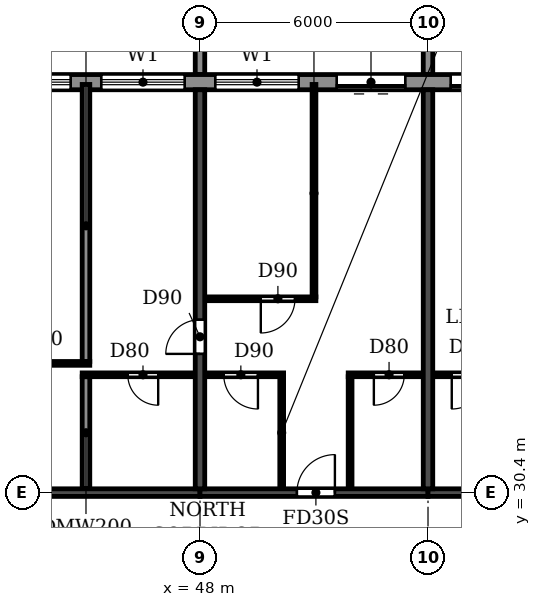
"""IFC4 building model, lengths in metres.
Left out: names, types, materials, properties, quantities, classifications, styles, units other than length and angle.
Written with IfcOpenShell. Run it as: python <this file> out.ifc"""

import sys

from ifc_helpers import new_model, si_unit, direction, frame, frame_2d, origin, place, context, subcontext, project, spatial, polyline, rectangle, outline, extrude, source, transform, mapped, element, fill, save


model = new_model("IFC4")
c1 = context("Model", 3, precision=1e-05, world=origin(), true_north=direction((0.0, 1.0)))
c2 = subcontext(c1, "Body", "Model", "MODEL_VIEW")
j1 = project(units=[si_unit("LENGTHUNIT", "METRE"), si_unit("PLANEANGLEUNIT", "RADIAN")], contexts=[c1])
p1 = place(None, origin())
s1 = spatial("IfcSite", under=j1, at=p1, CompositionType="ELEMENT")
p2 = place(p1, origin())
s2 = spatial("IfcBuilding", under=s1, at=p2, CompositionType="ELEMENT")
p3 = place(p2, frame((0.0, 0.0, 251.1)))
s3 = spatial("IfcBuildingStorey", under=s2, at=p3, CompositionType="ELEMENT", Elevation=251.1)
p4 = place(p3, frame((48.0, 30.5, 0.0), z_axis=(0.0, 0.0, 1.0), x_axis=(0.0, 1.0, 0.0)))
e1 = element("IfcWall", 1, at=p4, inside=s3, PredefinedType="SHEAR", context=c2, shape_type="SweptSolid", body=[
    extrude(rectangle(XDim=10.5, YDim=0.25, at=frame_2d((5.25, 0.0))), origin(), (0.0, 0.0, 1.0), 3.08),
])
p5 = place(p4, frame((3.55, 0.0, 0.0)))
e2 = element("IfcOpeningElement", 2, at=p5, cuts=e1, PredefinedType="OPENING", context=c2, shape_type="SweptSolid", body=[
    extrude(rectangle(XDim=0.9, YDim=2.1, at=frame_2d((0.45, 1.05))), frame((0.0, 0.135, 0.0), z_axis=(0.0, -1.0, 0.0), x_axis=(1.0, 0.0, 0.0)), (0.0, 0.0, 1.0), 0.27),
])
p6 = place(p3, frame((54.0, 30.5, 0.0), z_axis=(0.0, 0.0, 1.0), x_axis=(0.0, 1.0, 0.0)))
e3 = element("IfcWall", 3, at=p6, inside=s3, PredefinedType="SHEAR", context=c2, shape_type="SweptSolid", body=[
    extrude(rectangle(XDim=10.5, YDim=0.25, at=frame_2d((5.25, 0.0))), origin(), (0.0, 0.0, 1.0), 3.08),
])
p7 = place(p3, frame((42.0, 30.4, 0.0), z_axis=(0.0, 0.0, 1.0), x_axis=(1.0, 0.0, 0.0)))
e4 = element("IfcWall", 4, at=p7, inside=s3, PredefinedType="SHEAR", context=c2, shape_type="SweptSolid", body=[
    extrude(rectangle(XDim=6.0, YDim=0.2, at=frame_2d((3.0, 0.0))), origin(), (0.0, 0.0, 1.0), 2.48),
])
p8 = place(p3, frame((48.0, 30.4, 0.0), z_axis=(0.0, 0.0, 1.0), x_axis=(1.0, 0.0, 0.0)))
e5 = element("IfcWall", 5, at=p8, inside=s3, PredefinedType="SHEAR", context=c2, shape_type="SweptSolid", body=[
    extrude(rectangle(XDim=6.0, YDim=0.2, at=frame_2d((3.0, 0.0))), origin(), (0.0, 0.0, 1.0), 2.48),
])
p9 = place(p8, frame((2.55, 0.0, 0.0)))
e6 = element("IfcOpeningElement", 6, at=p9, cuts=e5, PredefinedType="OPENING", context=c2, shape_type="SweptSolid", body=[
    extrude(rectangle(XDim=1.0, YDim=2.1, at=frame_2d((0.5, 1.05))), frame((0.0, 0.11, 0.0), z_axis=(0.0, -1.0, 0.0), x_axis=(1.0, 0.0, 0.0)), (0.0, 0.0, 1.0), 0.22),
])
p10 = place(p3, frame((54.0, 30.4, 0.0), z_axis=(0.0, 0.0, 1.0), x_axis=(1.0, 0.0, 0.0)))
e7 = element("IfcWall", 7, at=p10, inside=s3, PredefinedType="SHEAR", context=c2, shape_type="SweptSolid", body=[
    extrude(rectangle(XDim=6.0, YDim=0.2, at=frame_2d((3.0, 0.0))), origin(), (0.0, 0.0, 1.0), 2.48),
])
p11 = place(p10, frame((2.55, 0.0, 0.0)))
e8 = element("IfcOpeningElement", 8, at=p11, cuts=e7, PredefinedType="OPENING", context=c2, shape_type="SweptSolid", body=[
    extrude(rectangle(XDim=1.0, YDim=2.1, at=frame_2d((0.5, 1.05))), frame((0.0, 0.11, 0.0), z_axis=(0.0, -1.0, 0.0), x_axis=(1.0, 0.0, 0.0)), (0.0, 0.0, 1.0), 0.22),
])
p12 = place(p3, frame((79.317, 41.2, 0.0), z_axis=(0.0, 0.0, 1.0), x_axis=(-1.0, 0.0, 0.0)))
e9 = element("IfcWall", 9, at=p12, inside=s3, PredefinedType="STANDARD", context=c2, shape_type="SweptSolid", body=[
    extrude(rectangle(XDim=56.634, YDim=0.4, at=frame_2d((28.317, 0.0))), origin(), (0.0, 0.0, 1.0), 3.08),
])
p13 = place(p12, frame((52.717, 0.0, 0.9)))
e10 = element("IfcOpeningElement", 10, at=p13, cuts=e9, PredefinedType="OPENING", context=c2, shape_type="SweptSolid", body=[
    extrude(rectangle(XDim=2.2, YDim=1.5, at=frame_2d((1.1, 0.75))), frame((0.0, 0.21, 0.0), z_axis=(0.0, -1.0, 0.0), x_axis=(1.0, 0.0, 0.0)), (0.0, 0.0, 1.0), 0.42),
])
p14 = place(p12, frame((49.717, 0.0, 0.9)))
e11 = element("IfcOpeningElement", 11, at=p14, cuts=e9, PredefinedType="OPENING", context=c2, shape_type="SweptSolid", body=[
    extrude(rectangle(XDim=2.2, YDim=1.5, at=frame_2d((1.1, 0.75))), frame((0.0, 0.21, 0.0), z_axis=(0.0, -1.0, 0.0), x_axis=(1.0, 0.0, 0.0)), (0.0, 0.0, 1.0), 0.42),
])
p15 = place(p12, frame((46.717, 0.0, 0.9)))
e12 = element("IfcOpeningElement", 12, at=p15, cuts=e9, PredefinedType="OPENING", context=c2, shape_type="SweptSolid", body=[
    extrude(rectangle(XDim=2.2, YDim=1.5, at=frame_2d((1.1, 0.75))), frame((0.0, 0.21, 0.0), z_axis=(0.0, -1.0, 0.0), x_axis=(1.0, 0.0, 0.0)), (0.0, 0.0, 1.0), 0.42),
])
p16 = place(p12, frame((43.917, 0.0, 0.0)))
e13 = element("IfcOpeningElement", 13, at=p16, cuts=e9, PredefinedType="OPENING", context=c2, shape_type="SweptSolid", body=[
    extrude(rectangle(XDim=1.8, YDim=2.4, at=frame_2d((0.9, 1.2))), frame((0.0, 0.21, 0.0), z_axis=(0.0, -1.0, 0.0), x_axis=(1.0, 0.0, 0.0)), (0.0, 0.0, 1.0), 0.42),
])
p17 = place(p12, frame((40.717, 0.0, 0.9)))
e14 = element("IfcOpeningElement", 14, at=p17, cuts=e9, PredefinedType="OPENING", context=c2, shape_type="SweptSolid", body=[
    extrude(rectangle(XDim=2.2, YDim=1.5, at=frame_2d((1.1, 0.75))), frame((0.0, 0.21, 0.0), z_axis=(0.0, -1.0, 0.0), x_axis=(1.0, 0.0, 0.0)), (0.0, 0.0, 1.0), 0.42),
])
p18 = place(p12, frame((37.917, 0.0, 0.0)))
e15 = element("IfcOpeningElement", 15, at=p18, cuts=e9, PredefinedType="OPENING", context=c2, shape_type="SweptSolid", body=[
    extrude(rectangle(XDim=1.8, YDim=2.4, at=frame_2d((0.9, 1.2))), frame((0.0, 0.21, 0.0), z_axis=(0.0, -1.0, 0.0), x_axis=(1.0, 0.0, 0.0)), (0.0, 0.0, 1.0), 0.42),
])
p19 = place(p12, frame((34.717, 0.0, 0.9)))
e16 = element("IfcOpeningElement", 16, at=p19, cuts=e9, PredefinedType="OPENING", context=c2, shape_type="SweptSolid", body=[
    extrude(rectangle(XDim=2.2, YDim=1.5, at=frame_2d((1.1, 0.75))), frame((0.0, 0.21, 0.0), z_axis=(0.0, -1.0, 0.0), x_axis=(1.0, 0.0, 0.0)), (0.0, 0.0, 1.0), 0.42),
])
p20 = place(p12, frame((31.717, 0.0, 0.9)))
e17 = element("IfcOpeningElement", 17, at=p20, cuts=e9, PredefinedType="OPENING", context=c2, shape_type="SweptSolid", body=[
    extrude(rectangle(XDim=2.2, YDim=1.5, at=frame_2d((1.1, 0.75))), frame((0.0, 0.21, 0.0), z_axis=(0.0, -1.0, 0.0), x_axis=(1.0, 0.0, 0.0)), (0.0, 0.0, 1.0), 0.42),
])
p21 = place(p12, frame((28.717, 0.0, 0.9)))
e18 = element("IfcOpeningElement", 18, at=p21, cuts=e9, PredefinedType="OPENING", context=c2, shape_type="SweptSolid", body=[
    extrude(rectangle(XDim=2.2, YDim=1.5, at=frame_2d((1.1, 0.75))), frame((0.0, 0.21, 0.0), z_axis=(0.0, -1.0, 0.0), x_axis=(1.0, 0.0, 0.0)), (0.0, 0.0, 1.0), 0.42),
])
p22 = place(p12, frame((25.917, 0.0, 0.0)))
e19 = element("IfcOpeningElement", 19, at=p22, cuts=e9, PredefinedType="OPENING", context=c2, shape_type="SweptSolid", body=[
    extrude(rectangle(XDim=1.8, YDim=2.4, at=frame_2d((0.9, 1.2))), frame((0.0, 0.21, 0.0), z_axis=(0.0, -1.0, 0.0), x_axis=(1.0, 0.0, 0.0)), (0.0, 0.0, 1.0), 0.42),
])
p23 = place(p12, frame((22.917, 0.0, 0.0)))
e20 = element("IfcOpeningElement", 20, at=p23, cuts=e9, PredefinedType="OPENING", context=c2, shape_type="SweptSolid", body=[
    extrude(rectangle(XDim=1.8, YDim=2.4, at=frame_2d((0.9, 1.2))), frame((0.0, 0.21, 0.0), z_axis=(0.0, -1.0, 0.0), x_axis=(1.0, 0.0, 0.0)), (0.0, 0.0, 1.0), 0.42),
])
p24 = place(p12, frame((19.717, 0.0, 0.9)))
e21 = element("IfcOpeningElement", 21, at=p24, cuts=e9, PredefinedType="OPENING", context=c2, shape_type="SweptSolid", body=[
    extrude(rectangle(XDim=2.2, YDim=1.5, at=frame_2d((1.1, 0.75))), frame((0.0, 0.21, 0.0), z_axis=(0.0, -1.0, 0.0), x_axis=(1.0, 0.0, 0.0)), (0.0, 0.0, 1.0), 0.42),
])
p25 = place(p12, frame((16.717, 0.0, 0.9)))
e22 = element("IfcOpeningElement", 22, at=p25, cuts=e9, PredefinedType="OPENING", context=c2, shape_type="SweptSolid", body=[
    extrude(rectangle(XDim=2.2, YDim=1.5, at=frame_2d((1.1, 0.75))), frame((0.0, 0.21, 0.0), z_axis=(0.0, -1.0, 0.0), x_axis=(1.0, 0.0, 0.0)), (0.0, 0.0, 1.0), 0.42),
])
p26 = place(p12, frame((13.717, 0.0, 0.9)))
e23 = element("IfcOpeningElement", 23, at=p26, cuts=e9, PredefinedType="OPENING", context=c2, shape_type="SweptSolid", body=[
    extrude(rectangle(XDim=2.2, YDim=1.5, at=frame_2d((1.1, 0.75))), frame((0.0, 0.21, 0.0), z_axis=(0.0, -1.0, 0.0), x_axis=(1.0, 0.0, 0.0)), (0.0, 0.0, 1.0), 0.42),
])
p27 = place(p12, frame((10.717, 0.0, 0.9)))
e24 = element("IfcOpeningElement", 24, at=p27, cuts=e9, PredefinedType="OPENING", context=c2, shape_type="SweptSolid", body=[
    extrude(rectangle(XDim=2.2, YDim=1.5, at=frame_2d((1.1, 0.75))), frame((0.0, 0.21, 0.0), z_axis=(0.0, -1.0, 0.0), x_axis=(1.0, 0.0, 0.0)), (0.0, 0.0, 1.0), 0.42),
])
p28 = place(p12, frame((7.917, 0.0, 0.0)))
e25 = element("IfcOpeningElement", 25, at=p28, cuts=e9, PredefinedType="OPENING", context=c2, shape_type="SweptSolid", body=[
    extrude(rectangle(XDim=1.8, YDim=2.4, at=frame_2d((0.9, 1.2))), frame((0.0, 0.21, 0.0), z_axis=(0.0, -1.0, 0.0), x_axis=(1.0, 0.0, 0.0)), (0.0, 0.0, 1.0), 0.42),
])
p29 = place(p12, frame((4.717, 0.0, 0.9)))
e26 = element("IfcOpeningElement", 26, at=p29, cuts=e9, PredefinedType="OPENING", context=c2, shape_type="SweptSolid", body=[
    extrude(rectangle(XDim=2.2, YDim=1.5, at=frame_2d((1.1, 0.75))), frame((0.0, 0.21, 0.0), z_axis=(0.0, -1.0, 0.0), x_axis=(1.0, 0.0, 0.0)), (0.0, 0.0, 1.0), 0.42),
])
p30 = place(p12, frame((1.917, 0.0, 0.0)))
e27 = element("IfcOpeningElement", 27, at=p30, cuts=e9, PredefinedType="OPENING", context=c2, shape_type="SweptSolid", body=[
    extrude(rectangle(XDim=1.8, YDim=2.4, at=frame_2d((0.9, 1.2))), frame((0.0, 0.21, 0.0), z_axis=(0.0, -1.0, 0.0), x_axis=(1.0, 0.0, 0.0)), (0.0, 0.0, 1.0), 0.42),
])
m1 = source(origin(), c2, "Body", "SweptSolid", [
    extrude(outline(polyline([(0.0, 0.0), (0.25, 0.0), (0.25, 3.1), (0.0, 3.1), (0.0, 0.0)])), origin(), (0.0, 0.0, 1.0), 3.1),
])
for number, where in (
    (28, (47.875, 41.4, 0.0)),
    (29, (53.875, 41.4, 0.0)),
):
    element("IfcWall", number, at=place(p3, frame(where)), inside=s3, PredefinedType="STANDARD", context=c2, shape_type="MappedRepresentation", body=[
        mapped(m1, transform((0.0, 0.0, 0.0))),
    ])
p31 = place(p3, frame((45.0, 30.51, 0.0), z_axis=(0.0, 0.0, 1.0), x_axis=(0.0, 1.0, 0.0)))
e30 = element("IfcWall", 30, at=p31, inside=s3, PredefinedType="PARTITIONING", context=c2, shape_type="SweptSolid", body=[
    extrude(rectangle(XDim=2.94, YDim=0.2, at=frame_2d((1.47, 0.0))), origin(), (0.0, 0.0, 1.0), 3.08),
])
p32 = place(p3, frame((45.0, 33.85, 0.0), z_axis=(0.0, 0.0, 1.0), x_axis=(0.0, 1.0, 0.0)))
e31 = element("IfcWall", 31, at=p32, inside=s3, PredefinedType="PARTITIONING", context=c2, shape_type="SweptSolid", body=[
    extrude(rectangle(XDim=7.29, YDim=0.2, at=frame_2d((3.645, 0.0))), origin(), (0.0, 0.0, 1.0), 3.08),
])
p33 = place(p3, frame((44.9, 33.5, 0.0), z_axis=(0.0, 0.0, 1.0), x_axis=(1.0, 0.0, 0.0)))
e32 = element("IfcWall", 32, at=p33, inside=s3, PredefinedType="PARTITIONING", context=c2, shape_type="SweptSolid", body=[
    extrude(rectangle(XDim=2.965, YDim=0.1, at=frame_2d((1.482, 0.0))), origin(), (0.0, 0.0, 1.0), 3.08),
])
p34 = place(p33, frame((1.2, 0.0, 0.0)))
e33 = element("IfcOpeningElement", 33, at=p34, cuts=e32, PredefinedType="OPENING", context=c2, shape_type="SweptSolid", body=[
    extrude(rectangle(XDim=0.8, YDim=2.1, at=frame_2d((0.4, 1.05))), frame((0.0, 0.06, 0.0), z_axis=(0.0, -1.0, 0.0), x_axis=(1.0, 0.0, 0.0)), (0.0, 0.0, 1.0), 0.12),
])
p35 = place(p3, frame((48.135, 33.5, 0.0), z_axis=(0.0, 0.0, 1.0), x_axis=(1.0, 0.0, 0.0)))
e34 = element("IfcWall", 34, at=p35, inside=s3, PredefinedType="PARTITIONING", context=c2, shape_type="SweptSolid", body=[
    extrude(rectangle(XDim=2.065, YDim=0.1, at=frame_2d((1.032, 0.0))), origin(), (0.0, 0.0, 1.0), 3.08),
])
p36 = place(p35, frame((0.49, 0.0, 0.0)))
e35 = element("IfcOpeningElement", 35, at=p36, cuts=e34, PredefinedType="OPENING", context=c2, shape_type="SweptSolid", body=[
    extrude(rectangle(XDim=0.9, YDim=2.1, at=frame_2d((0.45, 1.05))), frame((0.0, 0.06, 0.0), z_axis=(0.0, -1.0, 0.0), x_axis=(1.0, 0.0, 0.0)), (0.0, 0.0, 1.0), 0.12),
])
p37 = place(p3, frame((51.9, 33.5, 0.0), z_axis=(0.0, 0.0, 1.0), x_axis=(1.0, 0.0, 0.0)))
e36 = element("IfcWall", 36, at=p37, inside=s3, PredefinedType="PARTITIONING", context=c2, shape_type="SweptSolid", body=[
    extrude(rectangle(XDim=1.965, YDim=0.1, at=frame_2d((0.982, 0.0))), origin(), (0.0, 0.0, 1.0), 3.08),
])
p38 = place(p37, frame((0.675, 0.0, 0.0)))
e37 = element("IfcOpeningElement", 37, at=p38, cuts=e36, PredefinedType="OPENING", context=c2, shape_type="SweptSolid", body=[
    extrude(rectangle(XDim=0.8, YDim=2.1, at=frame_2d((0.4, 1.05))), frame((0.0, 0.06, 0.0), z_axis=(0.0, -1.0, 0.0), x_axis=(1.0, 0.0, 0.0)), (0.0, 0.0, 1.0), 0.12),
])
p39 = place(p3, frame((54.135, 33.5, 0.0), z_axis=(0.0, 0.0, 1.0), x_axis=(1.0, 0.0, 0.0)))
e38 = element("IfcWall", 38, at=p39, inside=s3, PredefinedType="PARTITIONING", context=c2, shape_type="SweptSolid", body=[
    extrude(rectangle(XDim=2.065, YDim=0.1, at=frame_2d((1.032, 0.0))), origin(), (0.0, 0.0, 1.0), 3.08),
])
p40 = place(p39, frame((0.49, 0.0, 0.0)))
e39 = element("IfcOpeningElement", 39, at=p40, cuts=e38, PredefinedType="OPENING", context=c2, shape_type="SweptSolid", body=[
    extrude(rectangle(XDim=0.9, YDim=2.1, at=frame_2d((0.45, 1.05))), frame((0.0, 0.06, 0.0), z_axis=(0.0, -1.0, 0.0), x_axis=(1.0, 0.0, 0.0)), (0.0, 0.0, 1.0), 0.12),
])
p41 = place(p3, frame((42.135, 33.8, 0.0), z_axis=(0.0, 0.0, 1.0), x_axis=(1.0, 0.0, 0.0)))
e40 = element("IfcWall", 40, at=p41, inside=s3, PredefinedType="PARTITIONING", context=c2, shape_type="SweptSolid", body=[
    extrude(rectangle(XDim=2.965, YDim=0.1, at=frame_2d((1.482, 0.0))), origin(), (0.0, 0.0, 1.0), 3.08),
])
p42 = place(p41, frame((0.965, 0.0, 0.0)))
e41 = element("IfcOpeningElement", 41, at=p42, cuts=e40, PredefinedType="OPENING", context=c2, shape_type="SweptSolid", body=[
    extrude(rectangle(XDim=0.8, YDim=2.1, at=frame_2d((0.4, 1.05))), frame((0.0, 0.06, 0.0), z_axis=(0.0, -1.0, 0.0), x_axis=(1.0, 0.0, 0.0)), (0.0, 0.0, 1.0), 0.12),
])
p43 = place(p3, frame((48.135, 35.5, 0.0), z_axis=(0.0, 0.0, 1.0), x_axis=(1.0, 0.0, 0.0)))
e42 = element("IfcWall", 42, at=p43, inside=s3, PredefinedType="PARTITIONING", context=c2, shape_type="SweptSolid", body=[
    extrude(rectangle(XDim=2.915, YDim=0.1, at=frame_2d((1.458, 0.0))), origin(), (0.0, 0.0, 1.0), 3.08),
])
p44 = place(p43, frame((1.465, 0.0, 0.0)))
e43 = element("IfcOpeningElement", 43, at=p44, cuts=e42, PredefinedType="OPENING", context=c2, shape_type="SweptSolid", body=[
    extrude(rectangle(XDim=0.9, YDim=2.1, at=frame_2d((0.45, 1.05))), frame((0.0, 0.06, 0.0), z_axis=(0.0, -1.0, 0.0), x_axis=(1.0, 0.0, 0.0)), (0.0, 0.0, 1.0), 0.12),
])
p45 = place(p3, frame((50.15, 30.51, 0.0), z_axis=(0.0, 0.0, 1.0), x_axis=(0.0, 1.0, 0.0)))
e44 = element("IfcWall", 44, at=p45, inside=s3, PredefinedType="PARTITIONING", context=c2, shape_type="SweptSolid", body=[
    extrude(rectangle(XDim=2.94, YDim=0.1, at=frame_2d((1.47, 0.0))), origin(), (0.0, 0.0, 1.0), 3.08),
])
p46 = place(p3, frame((51.0, 35.55, 0.0), z_axis=(0.0, 0.0, 1.0), x_axis=(0.0, 1.0, 0.0)))
e45 = element("IfcWall", 45, at=p46, inside=s3, PredefinedType="PARTITIONING", context=c2, shape_type="SweptSolid", body=[
    extrude(rectangle(XDim=5.59, YDim=0.1, at=frame_2d((2.795, 0.0))), origin(), (0.0, 0.0, 1.0), 3.08),
])
p47 = place(p3, frame((51.95, 30.51, 0.0), z_axis=(0.0, 0.0, 1.0), x_axis=(0.0, 1.0, 0.0)))
e46 = element("IfcWall", 46, at=p47, inside=s3, PredefinedType="PARTITIONING", context=c2, shape_type="SweptSolid", body=[
    extrude(rectangle(XDim=2.94, YDim=0.1, at=frame_2d((1.47, 0.0))), origin(), (0.0, 0.0, 1.0), 3.08),
])
p48 = place(p19, origin())
e47 = element("IfcWindow", 47, at=p48, inside=s3, PartitioningType="DOUBLE_PANEL_HORIZONTAL", PredefinedType="WINDOW", context=c2, shape_type="SweptSolid", body=[
    extrude(rectangle(XDim=2.2, YDim=1.5, at=frame_2d((1.1, 0.75))), frame((0.0, 0.03, 0.0), z_axis=(0.0, -1.0, 0.0), x_axis=(1.0, 0.0, 0.0)), (0.0, 0.0, 1.0), 0.06),
])
fill(e16, e47)
p49 = place(p20, origin())
e48 = element("IfcWindow", 48, at=p49, inside=s3, PartitioningType="DOUBLE_PANEL_HORIZONTAL", PredefinedType="WINDOW", context=c2, shape_type="SweptSolid", body=[
    extrude(rectangle(XDim=2.2, YDim=1.5, at=frame_2d((1.1, 0.75))), frame((0.0, 0.03, 0.0), z_axis=(0.0, -1.0, 0.0), x_axis=(1.0, 0.0, 0.0)), (0.0, 0.0, 1.0), 0.06),
])
fill(e17, e48)
p50 = place(p21, origin())
e49 = element("IfcWindow", 49, at=p50, inside=s3, PartitioningType="DOUBLE_PANEL_HORIZONTAL", PredefinedType="WINDOW", context=c2, shape_type="SweptSolid", body=[
    extrude(rectangle(XDim=2.2, YDim=1.5, at=frame_2d((1.1, 0.75))), frame((0.0, 0.03, 0.0), z_axis=(0.0, -1.0, 0.0), x_axis=(1.0, 0.0, 0.0)), (0.0, 0.0, 1.0), 0.06),
])
fill(e18, e49)
p51 = place(p22, origin())
e50 = element("IfcDoor", 50, at=p51, inside=s3, OperationType="DOUBLE_DOOR_SLIDING", PredefinedType="DOOR", context=c2, shape_type="SweptSolid", body=[
    extrude(rectangle(XDim=1.8, YDim=2.4, at=frame_2d((0.9, 1.2))), frame((0.0, 0.025, 0.0), z_axis=(0.0, -1.0, 0.0), x_axis=(1.0, 0.0, 0.0)), (0.0, 0.0, 1.0), 0.05),
])
fill(e19, e50)
p52 = place(p23, origin())
e51 = element("IfcDoor", 51, at=p52, inside=s3, OperationType="DOUBLE_DOOR_SLIDING", PredefinedType="DOOR", context=c2, shape_type="SweptSolid", body=[
    extrude(rectangle(XDim=1.8, YDim=2.4, at=frame_2d((0.9, 1.2))), frame((0.0, 0.025, 0.0), z_axis=(0.0, -1.0, 0.0), x_axis=(1.0, 0.0, 0.0)), (0.0, 0.0, 1.0), 0.05),
])
fill(e20, e51)
p53 = place(p34, frame((0.8, 0.0, 0.0), z_axis=(0.0, 0.0, 1.0), x_axis=(-1.0, 0.0, 0.0)))
e52 = element("IfcDoor", 52, at=p53, inside=s3, OperationType="SINGLE_SWING_LEFT", PredefinedType="DOOR", context=c2, shape_type="SweptSolid", body=[
    extrude(rectangle(XDim=0.8, YDim=2.1, at=frame_2d((0.4, 1.05))), frame((0.0, 0.025, 0.0), z_axis=(0.0, -1.0, 0.0), x_axis=(1.0, 0.0, 0.0)), (0.0, 0.0, 1.0), 0.05),
])
fill(e33, e52)
p54 = place(p5, origin())
e53 = element("IfcDoor", 53, at=p54, inside=s3, OperationType="SINGLE_SWING_LEFT", PredefinedType="DOOR", context=c2, shape_type="SweptSolid", body=[
    extrude(rectangle(XDim=0.9, YDim=2.1, at=frame_2d((0.45, 1.05))), frame((0.0, 0.025, 0.0), z_axis=(0.0, -1.0, 0.0), x_axis=(1.0, 0.0, 0.0)), (0.0, 0.0, 1.0), 0.05),
])
fill(e2, e53)
p55 = place(p36, frame((0.9, 0.0, 0.0), z_axis=(0.0, 0.0, 1.0), x_axis=(-1.0, 0.0, 0.0)))
e54 = element("IfcDoor", 54, at=p55, inside=s3, OperationType="SINGLE_SWING_LEFT", PredefinedType="DOOR", context=c2, shape_type="SweptSolid", body=[
    extrude(rectangle(XDim=0.9, YDim=2.1, at=frame_2d((0.45, 1.05))), frame((0.0, 0.025, 0.0), z_axis=(0.0, -1.0, 0.0), x_axis=(1.0, 0.0, 0.0)), (0.0, 0.0, 1.0), 0.05),
])
fill(e35, e54)
p56 = place(p44, frame((0.9, 0.0, 0.0), z_axis=(0.0, 0.0, 1.0), x_axis=(-1.0, 0.0, 0.0)))
e55 = element("IfcDoor", 55, at=p56, inside=s3, OperationType="SINGLE_SWING_RIGHT", PredefinedType="DOOR", context=c2, shape_type="SweptSolid", body=[
    extrude(rectangle(XDim=0.9, YDim=2.1, at=frame_2d((0.45, 1.05))), frame((0.0, 0.025, 0.0), z_axis=(0.0, -1.0, 0.0), x_axis=(1.0, 0.0, 0.0)), (0.0, 0.0, 1.0), 0.05),
])
fill(e43, e55)
p57 = place(p9, origin())
e56 = element("IfcDoor", 56, at=p57, inside=s3, OperationType="SINGLE_SWING_RIGHT", PredefinedType="DOOR", context=c2, shape_type="SweptSolid", body=[
    extrude(rectangle(XDim=1.0, YDim=2.1, at=frame_2d((0.5, 1.05))), frame((0.0, 0.025, 0.0), z_axis=(0.0, -1.0, 0.0), x_axis=(1.0, 0.0, 0.0)), (0.0, 0.0, 1.0), 0.05),
])
fill(e6, e56)
p58 = place(p38, frame((0.8, 0.0, 0.0), z_axis=(0.0, 0.0, 1.0), x_axis=(-1.0, 0.0, 0.0)))
e57 = element("IfcDoor", 57, at=p58, inside=s3, OperationType="SINGLE_SWING_RIGHT", PredefinedType="DOOR", context=c2, shape_type="SweptSolid", body=[
    extrude(rectangle(XDim=0.8, YDim=2.1, at=frame_2d((0.4, 1.05))), frame((0.0, 0.025, 0.0), z_axis=(0.0, -1.0, 0.0), x_axis=(1.0, 0.0, 0.0)), (0.0, 0.0, 1.0), 0.05),
])
fill(e37, e57)
p59 = place(p40, frame((0.9, 0.0, 0.0), z_axis=(0.0, 0.0, 1.0), x_axis=(-1.0, 0.0, 0.0)))
e58 = element("IfcDoor", 58, at=p59, inside=s3, OperationType="SINGLE_SWING_RIGHT", PredefinedType="DOOR", context=c2, shape_type="SweptSolid", body=[
    extrude(rectangle(XDim=0.9, YDim=2.1, at=frame_2d((0.45, 1.05))), frame((0.0, 0.025, 0.0), z_axis=(0.0, -1.0, 0.0), x_axis=(1.0, 0.0, 0.0)), (0.0, 0.0, 1.0), 0.05),
])
fill(e39, e58)
save(model, sys.argv[1])
